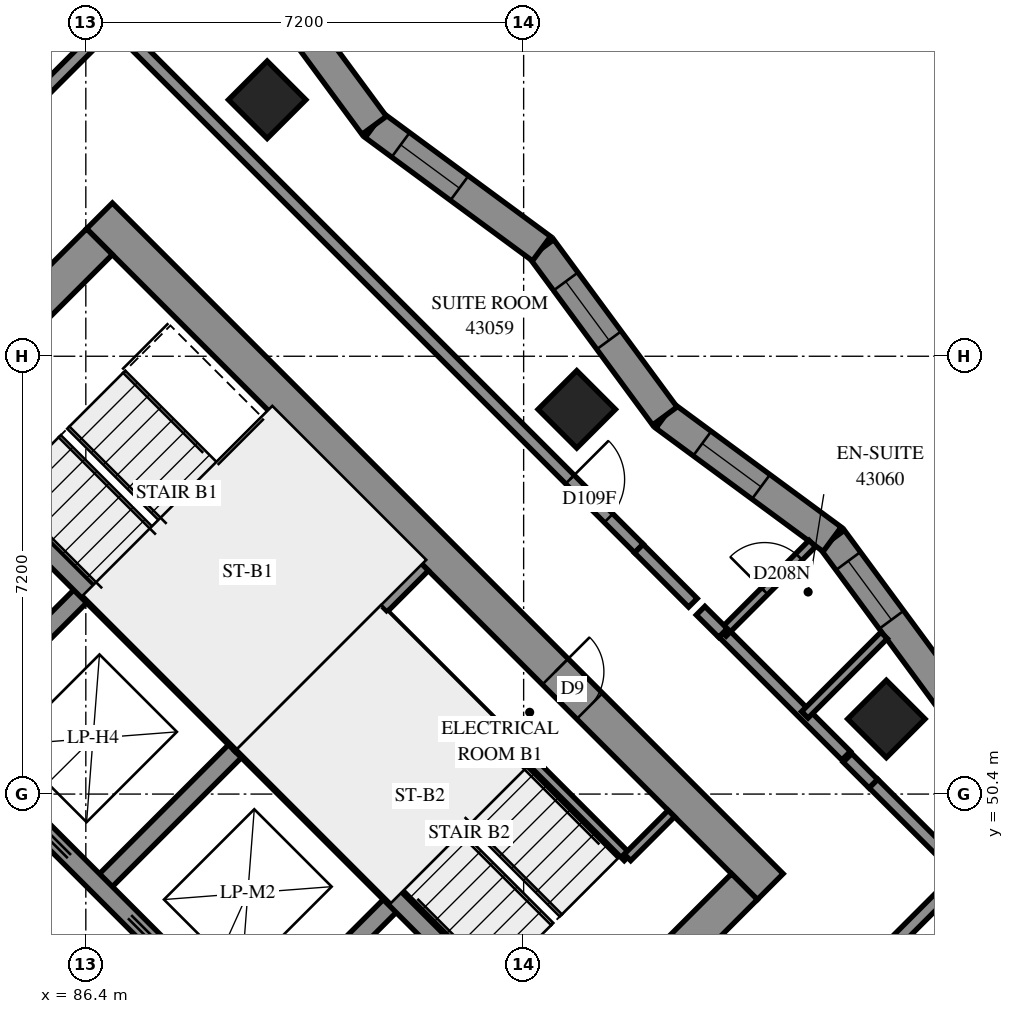
"""IFC4 building model, lengths in metres.
Left out: names, types, materials, properties, quantities, classifications, styles, units other than length and angle.
Written with IfcOpenShell. Run it as: python <this file> out.ifc"""

import sys

from ifc_helpers import new_model, si_unit, direction, frame, frame_2d, origin, origin_2d, place, context, subcontext, project, spatial, polyline, rectangle, outline, extrude, element, fill, save


model = new_model("IFC4")
c1 = context("Model", 3, precision=1e-05, world=origin(), true_north=direction((0.0, 1.0)))
c2 = subcontext(c1, "Body", "Model", "MODEL_VIEW")
j1 = project(units=[si_unit("LENGTHUNIT", "METRE"), si_unit("PLANEANGLEUNIT", "RADIAN")], contexts=[c1])
p1 = place(None, origin())
s1 = spatial("IfcSite", under=j1, at=p1, CompositionType="ELEMENT")
p2 = place(p1, origin())
s2 = spatial("IfcBuilding", under=s1, at=p2, CompositionType="ELEMENT")
p3 = place(p2, frame((0.0, 0.0, 159.2)))
s3 = spatial("IfcBuildingStorey", under=s2, at=p3, CompositionType="ELEMENT", Elevation=159.2)
for number, where, z_axis, x_axis in (
    (1, (89.382, 61.818, 0.0), (0.0, 0.0, 1.0), (0.707, -0.707, 0.0)),
    (2, (94.474, 56.727, 0.0), (0.0, 0.0, 1.0), (0.707, -0.707, 0.0)),
    (3, (99.565, 51.635, 0.0), (0.0, 0.0, 1.0), (0.707, -0.707, 0.0)),
):
    element("IfcColumn", number, at=place(p3, frame(where, z_axis=z_axis, x_axis=x_axis)), inside=s3, PredefinedType="COLUMN", context=c2, shape_type="SweptSolid", body=[
        extrude(rectangle(XDim=0.9, YDim=0.9, at=origin_2d()), origin(), (0.0, 0.0, 1.0), 3.1),
    ])
p4 = place(p3, frame((76.018, 49.302, -0.3), z_axis=(0.0, 0.0, 1.0), x_axis=(0.7071067812, -0.7071067812, 0.0)))
e4 = element("IfcWall", 4, at=p4, inside=s3, PredefinedType="SHEAR", context=c2, shape_type="SweptSolid", body=[
    extrude(rectangle(XDim=15.6, YDim=0.6, at=frame_2d((7.8, 0.0))), origin(), (0.0, 0.0, 1.0), 2.7),
])
p5 = place(p3, frame((86.625, 59.908, -0.3), z_axis=(0.0, 0.0, 1.0), x_axis=(0.7071067812, -0.7071067812, 0.0)))
e5 = element("IfcWall", 5, at=p5, inside=s3, PredefinedType="SHEAR", context=c2, shape_type="SweptSolid", body=[
    extrude(rectangle(XDim=15.6, YDim=0.6, at=frame_2d((7.8, 0.0))), origin(), (0.0, 0.0, 1.0), 2.7),
])
p6 = place(p5, frame((10.6, 0.0, 0.3)))
e6 = element("IfcOpeningElement", 6, at=p6, cuts=e5, PredefinedType="OPENING", context=c2, shape_type="SweptSolid", body=[
    extrude(rectangle(XDim=0.8, YDim=2.1, at=frame_2d((0.4, 1.05))), frame((0.0, 0.31, 0.0), z_axis=(0.0, -1.0, 0.0), x_axis=(1.0, 0.0, 0.0)), (0.0, 0.0, 1.0), 0.62),
])
p7 = place(p3, frame((76.442, 49.302, -0.3), z_axis=(0.0, 0.0, 1.0), x_axis=(0.7071067812, 0.7071067812, 0.0)))
e7 = element("IfcWall", 7, at=p7, inside=s3, PredefinedType="SHEAR", context=c2, shape_type="SweptSolid", body=[
    extrude(rectangle(XDim=14.4, YDim=0.6, at=frame_2d((7.2, 0.0))), origin(), (0.0, 0.0, 1.0), 2.7),
])
p8 = place(p7, frame((4.55, 0.0, 0.3)))
e8 = element("IfcOpeningElement", 8, at=p8, cuts=e7, PredefinedType="OPENING", context=c2, shape_type="SweptSolid", body=[
    extrude(rectangle(XDim=1.1, YDim=2.1, at=frame_2d((0.55, 1.05))), frame((0.0, 0.31, 0.0), z_axis=(0.0, -1.0, 0.0), x_axis=(1.0, 0.0, 0.0)), (0.0, 0.0, 1.0), 0.62),
])
p9 = place(p7, frame((11.35, 0.0, 0.3)))
e9 = element("IfcOpeningElement", 9, at=p9, cuts=e7, PredefinedType="OPENING", context=c2, shape_type="SweptSolid", body=[
    extrude(rectangle(XDim=1.1, YDim=2.1, at=frame_2d((0.55, 1.05))), frame((0.0, 0.31, 0.0), z_axis=(0.0, -1.0, 0.0), x_axis=(1.0, 0.0, 0.0)), (0.0, 0.0, 1.0), 0.62),
])
p10 = place(p3, frame((87.049, 38.695, -0.3), z_axis=(0.0, 0.0, 1.0), x_axis=(0.7071067812, 0.7071067812, 0.0)))
e10 = element("IfcWall", 10, at=p10, inside=s3, PredefinedType="SHEAR", context=c2, shape_type="SweptSolid", body=[
    extrude(rectangle(XDim=14.4, YDim=0.6, at=frame_2d((7.2, 0.0))), origin(), (0.0, 0.0, 1.0), 2.7),
])
p11 = place(p10, frame((4.55, 0.0, 0.3)))
e11 = element("IfcOpeningElement", 11, at=p11, cuts=e10, PredefinedType="OPENING", context=c2, shape_type="SweptSolid", body=[
    extrude(rectangle(XDim=1.1, YDim=2.1, at=frame_2d((0.55, 1.05))), frame((0.0, 0.31, 0.0), z_axis=(0.0, -1.0, 0.0), x_axis=(1.0, 0.0, 0.0)), (0.0, 0.0, 1.0), 0.62),
])
p12 = place(p10, frame((11.35, 0.0, 0.3)))
e12 = element("IfcOpeningElement", 12, at=p12, cuts=e10, PredefinedType="OPENING", context=c2, shape_type="SweptSolid", body=[
    extrude(rectangle(XDim=1.1, YDim=2.1, at=frame_2d((0.55, 1.05))), frame((0.0, 0.31, 0.0), z_axis=(0.0, -1.0, 0.0), x_axis=(1.0, 0.0, 0.0)), (0.0, 0.0, 1.0), 0.62),
])
p13 = place(p3, frame((84.079, 51.423, 0.0), z_axis=(0.0, 0.0, 1.0), x_axis=(0.7071219326, 0.7070916295, 0.0)))
e13 = element("IfcWall", 13, at=p13, inside=s3, PredefinedType="SOLIDWALL", context=c2, shape_type="SweptSolid", body=[
    extrude(rectangle(XDim=3.3, YDim=0.3, at=frame_2d((1.65, 0.0))), origin(), (0.0, 0.0, 1.0), 3.1),
])
for number, where, z_axis, x_axis in (
    (14, (86.625, 48.878, 0.0), (0.0, 0.0, 1.0), (0.707, 0.707, 0.0)),
    (15, (89.17, 46.332, 0.0), (0.0, 0.0, 1.0), (0.707, 0.707, 0.0)),
):
    element("IfcWall", number, at=place(p3, frame(where, z_axis=z_axis, x_axis=x_axis)), inside=s3, PredefinedType="SOLIDWALL", context=c2, shape_type="SweptSolid", body=[
        extrude(rectangle(XDim=3.3, YDim=0.3, at=frame_2d((1.65, 0.0))), origin(), (0.0, 0.0, 1.0), 3.1),
    ])
p14 = place(p3, frame((78.988, 51.423, 0.0), z_axis=(0.0, 0.0, 1.0), x_axis=(0.7071067812, -0.7071067812, 0.0)))
e16 = element("IfcWall", 16, at=p14, inside=s3, PredefinedType="SOLIDWALL", context=c2, shape_type="SweptSolid", body=[
    extrude(rectangle(XDim=14.4, YDim=0.3, at=frame_2d((7.2, 0.0))), origin(), (0.0, 0.0, 1.0), 3.1),
])
p15 = place(p14, frame((1.35, 0.0, 0.0)))
e17 = element("IfcOpeningElement", 17, at=p15, cuts=e16, PredefinedType="OPENING", context=c2, shape_type="SweptSolid", body=[
    extrude(rectangle(XDim=0.9, YDim=2.1, at=frame_2d((0.45, 1.05))), frame((0.0, 0.16, 0.0), z_axis=(0.0, -1.0, 0.0), x_axis=(1.0, 0.0, 0.0)), (0.0, 0.0, 1.0), 0.32),
])
p16 = place(p14, frame((4.95, 0.0, 0.0)))
e18 = element("IfcOpeningElement", 18, at=p16, cuts=e16, PredefinedType="OPENING", context=c2, shape_type="SweptSolid", body=[
    extrude(rectangle(XDim=0.9, YDim=2.1, at=frame_2d((0.45, 1.05))), frame((0.0, 0.16, 0.0), z_axis=(0.0, -1.0, 0.0), x_axis=(1.0, 0.0, 0.0)), (0.0, 0.0, 1.0), 0.32),
])
p17 = place(p14, frame((8.55, 0.0, 0.0)))
e19 = element("IfcOpeningElement", 19, at=p17, cuts=e16, PredefinedType="OPENING", context=c2, shape_type="SweptSolid", body=[
    extrude(rectangle(XDim=0.9, YDim=2.1, at=frame_2d((0.45, 1.05))), frame((0.0, 0.16, 0.0), z_axis=(0.0, -1.0, 0.0), x_axis=(1.0, 0.0, 0.0)), (0.0, 0.0, 1.0), 0.32),
])
p18 = place(p14, frame((12.05, 0.0, 0.0)))
e20 = element("IfcOpeningElement", 20, at=p18, cuts=e16, PredefinedType="OPENING", context=c2, shape_type="SweptSolid", body=[
    extrude(rectangle(XDim=1.1, YDim=2.1, at=frame_2d((0.55, 1.05))), frame((0.0, 0.16, 0.0), z_axis=(0.0, -1.0, 0.0), x_axis=(1.0, 0.0, 0.0)), (0.0, 0.0, 1.0), 0.32),
])
p19 = place(p3, frame((81.534, 53.969, 0.0), z_axis=(0.0, 0.0, 1.0), x_axis=(0.707103309, -0.7071102534, 0.0)))
e21 = element("IfcWall", 21, at=p19, inside=s3, PredefinedType="SOLIDWALL", context=c2, shape_type="SweptSolid", body=[
    extrude(rectangle(XDim=14.4, YDim=0.3, at=frame_2d((7.2, 0.0))), origin(), (0.0, 0.0, 1.0), 3.1),
])
p20 = place(p19, frame((1.25, 0.0, 0.0)))
e22 = element("IfcOpeningElement", 22, at=p20, cuts=e21, PredefinedType="OPENING", context=c2, shape_type="SweptSolid", body=[
    extrude(rectangle(XDim=1.1, YDim=2.1, at=frame_2d((0.55, 1.05))), frame((0.0, 0.16, 0.0), z_axis=(0.0, -1.0, 0.0), x_axis=(1.0, 0.0, 0.0)), (0.0, 0.0, 1.0), 0.32),
])
p21 = place(p19, frame((4.85, 0.0, 0.0)))
e23 = element("IfcOpeningElement", 23, at=p21, cuts=e21, PredefinedType="OPENING", context=c2, shape_type="SweptSolid", body=[
    extrude(rectangle(XDim=1.1, YDim=2.1, at=frame_2d((0.55, 1.05))), frame((0.0, 0.16, 0.0), z_axis=(0.0, -1.0, 0.0), x_axis=(1.0, 0.0, 0.0)), (0.0, 0.0, 1.0), 0.32),
])
p22 = place(p19, frame((8.45, 0.0, 0.0)))
e24 = element("IfcOpeningElement", 24, at=p22, cuts=e21, PredefinedType="OPENING", context=c2, shape_type="SweptSolid", body=[
    extrude(rectangle(XDim=1.1, YDim=2.1, at=frame_2d((0.55, 1.05))), frame((0.0, 0.16, 0.0), z_axis=(0.0, -1.0, 0.0), x_axis=(1.0, 0.0, 0.0)), (0.0, 0.0, 1.0), 0.32),
])
p23 = place(p19, frame((12.05, 0.0, 0.0)))
e25 = element("IfcOpeningElement", 25, at=p23, cuts=e21, PredefinedType="OPENING", context=c2, shape_type="SweptSolid", body=[
    extrude(rectangle(XDim=1.1, YDim=2.1, at=frame_2d((0.55, 1.05))), frame((0.0, 0.16, 0.0), z_axis=(0.0, -1.0, 0.0), x_axis=(1.0, 0.0, 0.0)), (0.0, 0.0, 1.0), 0.32),
])
for number, where, z_axis, x_axis in (
    (26, (83.867, 56.302, 0.0), (0.0, 0.0, 1.0), (0.707, -0.707, 0.0)),
    (27, (88.958, 51.211, 0.0), (0.0, 0.0, 1.0), (0.707, -0.707, 0.0)),
):
    element("IfcWall", number, at=place(p3, frame(where, z_axis=z_axis, x_axis=x_axis)), inside=s3, PredefinedType="SOLIDWALL", context=c2, shape_type="SweptSolid", body=[
        extrude(rectangle(XDim=7.2, YDim=0.3, at=frame_2d((3.6, 0.0))), origin(), (0.0, 0.0, 1.0), 3.1),
    ])
p24 = place(p3, frame((88.958, 51.211, 0.0), z_axis=(0.0, 0.0, 1.0), x_axis=(0.7071067812, 0.7071067812, 0.0)))
e28 = element("IfcWall", 28, at=p24, inside=s3, PredefinedType="SOLIDWALL", context=c2, shape_type="SweptSolid", body=[
    extrude(rectangle(XDim=4.2, YDim=0.3, at=frame_2d((2.1, 0.0))), origin(), (0.0, 0.0, 1.0), 3.1),
])
p25 = place(p3, frame((100.702, 51.838, 0.0), z_axis=(0.0, 0.0, 1.0), x_axis=(-0.5932199928, 0.8050403966, 0.0)))
e29 = element("IfcWall", 29, at=p25, inside=s3, PredefinedType="SOLIDWALL", context=c2, shape_type="SweptSolid", body=[
    extrude(outline(polyline([(0.038, -0.25), (3.456, -0.25), (3.381, 0.25), (-0.038, 0.25), (0.038, -0.25)])), origin(), (0.0, 0.0, 1.0), 3.1),
])
p26 = place(p25, frame((1.774, 0.0, 0.45)))
e30 = element("IfcOpeningElement", 30, at=p26, cuts=e29, PredefinedType="OPENING", context=c2, shape_type="SweptSolid", body=[
    extrude(rectangle(XDim=1.2, YDim=2.5, at=frame_2d((0.6, 1.25))), frame((0.0, 0.26, 0.0), z_axis=(0.0, -1.0, 0.0), x_axis=(1.0, 0.0, 0.0)), (0.0, 0.0, 1.0), 0.52),
])
p27 = place(p3, frame((98.674, 54.59, 0.0), z_axis=(0.0, 0.0, 1.0), x_axis=(-0.8050440725, 0.5932150043, 0.0)))
e31 = element("IfcWall", 31, at=p27, inside=s3, PredefinedType="SOLIDWALL", context=c2, shape_type="SweptSolid", body=[
    extrude(outline(polyline([(-0.038, -0.25), (3.381, -0.25), (3.456, 0.25), (0.038, 0.25), (-0.038, -0.25)])), origin(), (0.0, 0.0, 1.0), 3.1),
])
p28 = place(p27, frame((1.455, 0.0, 0.45)))
e32 = element("IfcOpeningElement", 32, at=p28, cuts=e31, PredefinedType="OPENING", context=c2, shape_type="SweptSolid", body=[
    extrude(rectangle(XDim=1.2, YDim=2.5, at=frame_2d((0.6, 1.25))), frame((0.0, 0.26, 0.0), z_axis=(0.0, -1.0, 0.0), x_axis=(1.0, 0.0, 0.0)), (0.0, 0.0, 1.0), 0.52),
])
p29 = place(p3, frame((95.922, 56.618, 0.0), z_axis=(0.0, 0.0, 1.0), x_axis=(-0.5932150043, 0.8050440725, 0.0)))
e33 = element("IfcWall", 33, at=p29, inside=s3, PredefinedType="SOLIDWALL", context=c2, shape_type="SweptSolid", body=[
    extrude(outline(polyline([(0.038, -0.25), (3.456, -0.25), (3.381, 0.25), (-0.038, 0.25), (0.038, -0.25)])), origin(), (0.0, 0.0, 1.0), 3.1),
])
p30 = place(p29, frame((1.547, 0.0, 0.45)))
e34 = element("IfcOpeningElement", 34, at=p30, cuts=e33, PredefinedType="OPENING", context=c2, shape_type="SweptSolid", body=[
    extrude(rectangle(XDim=1.2, YDim=2.5, at=frame_2d((0.6, 1.25))), frame((0.0, 0.26, 0.0), z_axis=(0.0, -1.0, 0.0), x_axis=(1.0, 0.0, 0.0)), (0.0, 0.0, 1.0), 0.52),
])
p31 = place(p3, frame((93.894, 59.37, 0.0), z_axis=(0.0, 0.0, 1.0), x_axis=(-0.8050403966, 0.5932199928, 0.0)))
e35 = element("IfcWall", 35, at=p31, inside=s3, PredefinedType="SOLIDWALL", context=c2, shape_type="SweptSolid", body=[
    extrude(outline(polyline([(-0.038, -0.25), (3.381, -0.25), (3.456, 0.25), (0.038, 0.25), (-0.038, -0.25)])), origin(), (0.0, 0.0, 1.0), 3.1),
])
p32 = place(p31, frame((1.677, 0.0, 0.45)))
e36 = element("IfcOpeningElement", 36, at=p32, cuts=e35, PredefinedType="OPENING", context=c2, shape_type="SweptSolid", body=[
    extrude(rectangle(XDim=1.2, YDim=2.5, at=frame_2d((0.6, 1.25))), frame((0.0, 0.26, 0.0), z_axis=(0.0, -1.0, 0.0), x_axis=(1.0, 0.0, 0.0)), (0.0, 0.0, 1.0), 0.52),
])
p33 = place(p3, frame((91.142, 61.398, 0.0), z_axis=(0.0, 0.0, 1.0), x_axis=(-0.5932150043, 0.8050440725, 0.0)))
e37 = element("IfcWall", 37, at=p33, inside=s3, PredefinedType="SOLIDWALL", context=c2, shape_type="SweptSolid", body=[
    extrude(outline(polyline([(0.038, -0.25), (3.456, -0.25), (3.381, 0.25), (-0.038, 0.25), (0.038, -0.25)])), origin(), (0.0, 0.0, 1.0), 3.1),
])
p34 = place(p33, frame((1.77, 0.0, 0.45)))
e38 = element("IfcOpeningElement", 38, at=p34, cuts=e37, PredefinedType="OPENING", context=c2, shape_type="SweptSolid", body=[
    extrude(rectangle(XDim=1.2, YDim=2.5, at=frame_2d((0.6, 1.25))), frame((0.0, 0.26, 0.0), z_axis=(0.0, -1.0, 0.0), x_axis=(1.0, 0.0, 0.0)), (0.0, 0.0, 1.0), 0.52),
])
p35 = place(p3, frame((91.313, 53.354, 0.0), z_axis=(0.0, 0.0, 1.0), x_axis=(0.7071067812, -0.7071067812, 0.0)))
e39 = element("IfcWall", 39, at=p35, inside=s3, PredefinedType="PARTITIONING", context=c2, shape_type="SweptSolid", body=[
    extrude(rectangle(XDim=5.65, YDim=0.15, at=frame_2d((2.825, 0.0))), origin(), (0.0, 0.0, 1.0), 3.1),
])
p36 = place(p3, frame((95.308, 49.358, 0.0), z_axis=(0.0, 0.0, 1.0), x_axis=(0.70705776, 0.707155799, 0.0)))
e40 = element("IfcWall", 40, at=p36, inside=s3, PredefinedType="PARTITIONING", context=c2, shape_type="SweptSolid", body=[
    extrude(rectangle(XDim=1.02, YDim=0.15, at=frame_2d((0.51, 0.0))), origin(), (0.0, 0.0, 1.0), 3.1),
])
p37 = place(p3, frame((86.841, 63.093, 0.0), z_axis=(0.0, 0.0, 1.0), x_axis=(0.7071067812, -0.7071067812, 0.0)))
e41 = element("IfcWall", 41, at=p37, inside=s3, PredefinedType="PARTITIONING", context=c2, shape_type="SweptSolid", body=[
    extrude(rectangle(XDim=12.239, YDim=0.2, at=frame_2d((6.119, 0.0))), origin(), (0.0, 0.0, 1.0), 3.1),
])
p38 = place(p37, frame((10.634, 0.0, 0.0)))
e42 = element("IfcOpeningElement", 42, at=p38, cuts=e41, PredefinedType="OPENING", context=c2, shape_type="SweptSolid", body=[
    extrude(rectangle(XDim=0.9, YDim=2.1, at=frame_2d((0.45, 1.05))), frame((0.0, 0.11, 0.0), z_axis=(0.0, -1.0, 0.0), x_axis=(1.0, 0.0, 0.0)), (0.0, 0.0, 1.0), 0.22),
])
p39 = place(p3, frame((94.401, 41.383, 0.0), z_axis=(0.0, 0.0, 1.0), x_axis=(0.7071067812, 0.7071067812, 0.0)))
e43 = element("IfcWall", 43, at=p39, inside=s3, PredefinedType="PARTITIONING", context=c2, shape_type="SweptSolid", body=[
    extrude(rectangle(XDim=12.04, YDim=0.2, at=frame_2d((6.02, 0.0))), origin(), (0.0, 0.0, 1.0), 3.1),
])
p40 = place(p3, frame((93.767, 42.021, 0.0), z_axis=(0.0, 0.0, 1.0), x_axis=(0.7071067812, 0.7071067812, 0.0)))
e44 = element("IfcWall", 44, at=p40, inside=s3, PredefinedType="PARTITIONING", context=c2, shape_type="SweptSolid", body=[
    extrude(rectangle(XDim=9.998, YDim=0.2, at=frame_2d((4.999, 0.0))), origin(), (0.0, 0.0, 1.0), 3.1),
])
p41 = place(p40, frame((0.196, 0.0, 0.0)))
e45 = element("IfcOpeningElement", 45, at=p41, cuts=e44, PredefinedType="OPENING", context=c2, shape_type="SweptSolid", body=[
    extrude(rectangle(XDim=1.0, YDim=2.1, at=frame_2d((0.5, 1.05))), frame((0.0, 0.11, 0.0), z_axis=(0.0, -1.0, 0.0), x_axis=(1.0, 0.0, 0.0)), (0.0, 0.0, 1.0), 0.22),
])
p42 = place(p3, frame((79.799, 56.055, 0.0), z_axis=(0.0, 0.0, 1.0), x_axis=(0.7071067812, 0.7071067812, 0.0)))
e46 = element("IfcWall", 46, at=p42, inside=s3, PredefinedType="PARTITIONING", context=c2, shape_type="SweptSolid", body=[
    extrude(rectangle(XDim=9.95, YDim=0.2, at=frame_2d((4.975, 0.0))), origin(), (0.0, 0.0, 1.0), 3.1),
])
p43 = place(p42, frame((1.071, 0.0, 0.0)))
e47 = element("IfcOpeningElement", 47, at=p43, cuts=e46, PredefinedType="OPENING", context=c2, shape_type="SweptSolid", body=[
    extrude(rectangle(XDim=1.0, YDim=2.1, at=frame_2d((0.5, 1.05))), frame((0.0, 0.11, 0.0), z_axis=(0.0, -1.0, 0.0), x_axis=(1.0, 0.0, 0.0)), (0.0, 0.0, 1.0), 0.22),
])
p44 = place(p3, frame((96.882, 53.053, 0.0), z_axis=(0.0, 0.0, 1.0), x_axis=(0.7071067812, -0.7071067812, 0.0)))
e48 = element("IfcWall", 48, at=p44, inside=s3, PredefinedType="PARTITIONING", context=c2, shape_type="SweptSolid", body=[
    extrude(rectangle(XDim=2.86, YDim=0.2, at=frame_2d((1.43, 0.0))), origin(), (0.0, 0.0, 1.0), 3.1),
])
p45 = place(p3, frame((99.352, 50.574, 0.0), z_axis=(0.0, 0.0, 1.0), x_axis=(0.7075827869, -0.7066304548, 0.0)))
e49 = element("IfcWall", 49, at=p45, inside=s3, PredefinedType="PARTITIONING", context=c2, shape_type="SweptSolid", body=[
    extrude(rectangle(XDim=2.1, YDim=0.2, at=frame_2d((1.05, 0.0))), origin(), (0.0, 0.0, 1.0), 3.1),
])
p46 = place(p3, frame((96.877, 53.051, 0.0), z_axis=(0.0, 0.0, 1.0), x_axis=(0.7071067812, 0.7071067812, 0.0)))
e50 = element("IfcWall", 50, at=p46, inside=s3, PredefinedType="PARTITIONING", context=c2, shape_type="SweptSolid", body=[
    extrude(rectangle(XDim=2.078, YDim=0.15, at=frame_2d((1.039, 0.0))), origin(), (0.0, 0.0, 1.0), 3.1),
])
p47 = place(p46, frame((0.969, 0.0, 0.0)))
e51 = element("IfcOpeningElement", 51, at=p47, cuts=e50, PredefinedType="OPENING", context=c2, shape_type="SweptSolid", body=[
    extrude(rectangle(XDim=0.8, YDim=2.1, at=frame_2d((0.4, 1.05))), frame((0.0, 0.085, 0.0), z_axis=(0.0, -1.0, 0.0), x_axis=(1.0, 0.0, 0.0)), (0.0, 0.0, 1.0), 0.17),
])
p48 = place(p3, frame((98.224, 51.704, 0.0), z_axis=(0.0, 0.0, 1.0), x_axis=(0.7065103186, 0.7077027411, 0.0)))
e52 = element("IfcWall", 52, at=p48, inside=s3, PredefinedType="PARTITIONING", context=c2, shape_type="SweptSolid", body=[
    extrude(rectangle(XDim=1.845, YDim=0.15, at=frame_2d((0.922, 0.0))), origin(), (0.0, 0.0, 1.0), 3.1),
])
p49 = place(p3, frame((95.494, 54.438, 0.0), z_axis=(0.0, 0.0, 1.0), x_axis=(0.706312726, -0.7078999456, 0.0)))
e53 = element("IfcWall", 53, at=p49, inside=s3, PredefinedType="PARTITIONING", context=c2, shape_type="SweptSolid", body=[
    extrude(rectangle(XDim=1.26, YDim=0.2, at=frame_2d((0.63, 0.0))), origin(), (0.0, 0.0, 1.0), 3.1),
])
p50 = place(p3, frame((98.925, 50.995, 0.0), z_axis=(0.0, 0.0, 1.0), x_axis=(0.7071067812, -0.7071067812, 0.0)))
e54 = element("IfcWall", 54, at=p50, inside=s3, PredefinedType="PARTITIONING", context=c2, shape_type="SweptSolid", body=[
    extrude(rectangle(XDim=0.6, YDim=0.2, at=frame_2d((0.3, 0.0))), origin(), (0.0, 0.0, 1.0), 3.1),
])
p51 = place(p3, frame((96.51, 53.416, 0.0), z_axis=(0.0, 0.0, 1.0), x_axis=(0.7090308706, -0.7051774419, 0.0)))
e55 = element("IfcWall", 55, at=p51, inside=s3, PredefinedType="PARTITIONING", context=c2, shape_type="SweptSolid", body=[
    extrude(rectangle(XDim=0.519, YDim=0.2, at=frame_2d((0.26, 0.0))), origin(), (0.0, 0.0, 1.0), 3.1),
])
p52 = place(p26, origin())
e56 = element("IfcWindow", 56, at=p52, inside=s3, PartitioningType="SINGLE_PANEL", PredefinedType="WINDOW", context=c2, shape_type="SweptSolid", body=[
    extrude(rectangle(XDim=1.2, YDim=2.5, at=frame_2d((0.6, 1.25))), frame((0.0, 0.18, 0.0), z_axis=(0.0, -1.0, 0.0), x_axis=(1.0, 0.0, 0.0)), (0.0, 0.0, 1.0), 0.06),
])
fill(e30, e56)
p53 = place(p28, origin())
e57 = element("IfcWindow", 57, at=p53, inside=s3, PartitioningType="SINGLE_PANEL", PredefinedType="WINDOW", context=c2, shape_type="SweptSolid", body=[
    extrude(rectangle(XDim=1.2, YDim=2.5, at=frame_2d((0.6, 1.25))), frame((0.0, 0.18, 0.0), z_axis=(0.0, -1.0, 0.0), x_axis=(1.0, 0.0, 0.0)), (0.0, 0.0, 1.0), 0.06),
])
fill(e32, e57)
p54 = place(p30, origin())
e58 = element("IfcWindow", 58, at=p54, inside=s3, PartitioningType="SINGLE_PANEL", PredefinedType="WINDOW", context=c2, shape_type="SweptSolid", body=[
    extrude(rectangle(XDim=1.2, YDim=2.5, at=frame_2d((0.6, 1.25))), frame((0.0, 0.18, 0.0), z_axis=(0.0, -1.0, 0.0), x_axis=(1.0, 0.0, 0.0)), (0.0, 0.0, 1.0), 0.06),
])
fill(e34, e58)
p55 = place(p32, origin())
e59 = element("IfcWindow", 59, at=p55, inside=s3, PartitioningType="SINGLE_PANEL", PredefinedType="WINDOW", context=c2, shape_type="SweptSolid", body=[
    extrude(rectangle(XDim=1.2, YDim=2.5, at=frame_2d((0.6, 1.25))), frame((0.0, 0.18, 0.0), z_axis=(0.0, -1.0, 0.0), x_axis=(1.0, 0.0, 0.0)), (0.0, 0.0, 1.0), 0.06),
])
fill(e36, e59)
p56 = place(p6, origin())
e60 = element("IfcDoor", 60, at=p56, inside=s3, OperationType="SINGLE_SWING_RIGHT", PredefinedType="DOOR", context=c2, shape_type="SweptSolid", body=[
    extrude(rectangle(XDim=0.8, YDim=2.1, at=frame_2d((0.4, 1.05))), frame((0.0, 0.025, 0.0), z_axis=(0.0, -1.0, 0.0), x_axis=(1.0, 0.0, 0.0)), (0.0, 0.0, 1.0), 0.05),
])
fill(e6, e60)
p57 = place(p38, origin())
e61 = element("IfcDoor", 61, at=p57, inside=s3, OperationType="SINGLE_SWING_LEFT", PredefinedType="DOOR", context=c2, shape_type="SweptSolid", body=[
    extrude(rectangle(XDim=0.9, YDim=2.1, at=frame_2d((0.45, 1.05))), frame((0.0, 0.025, 0.0), z_axis=(0.0, -1.0, 0.0), x_axis=(1.0, 0.0, 0.0)), (0.0, 0.0, 1.0), 0.05),
])
fill(e42, e61)
p58 = place(p47, origin())
e62 = element("IfcDoor", 62, at=p58, inside=s3, OperationType="SINGLE_SWING_RIGHT", PredefinedType="DOOR", context=c2, shape_type="SweptSolid", body=[
    extrude(rectangle(XDim=0.8, YDim=2.1, at=frame_2d((0.4, 1.05))), frame((0.0, 0.025, 0.0), z_axis=(0.0, -1.0, 0.0), x_axis=(1.0, 0.0, 0.0)), (0.0, 0.0, 1.0), 0.05),
])
fill(e51, e62)
save(model, sys.argv[1])
